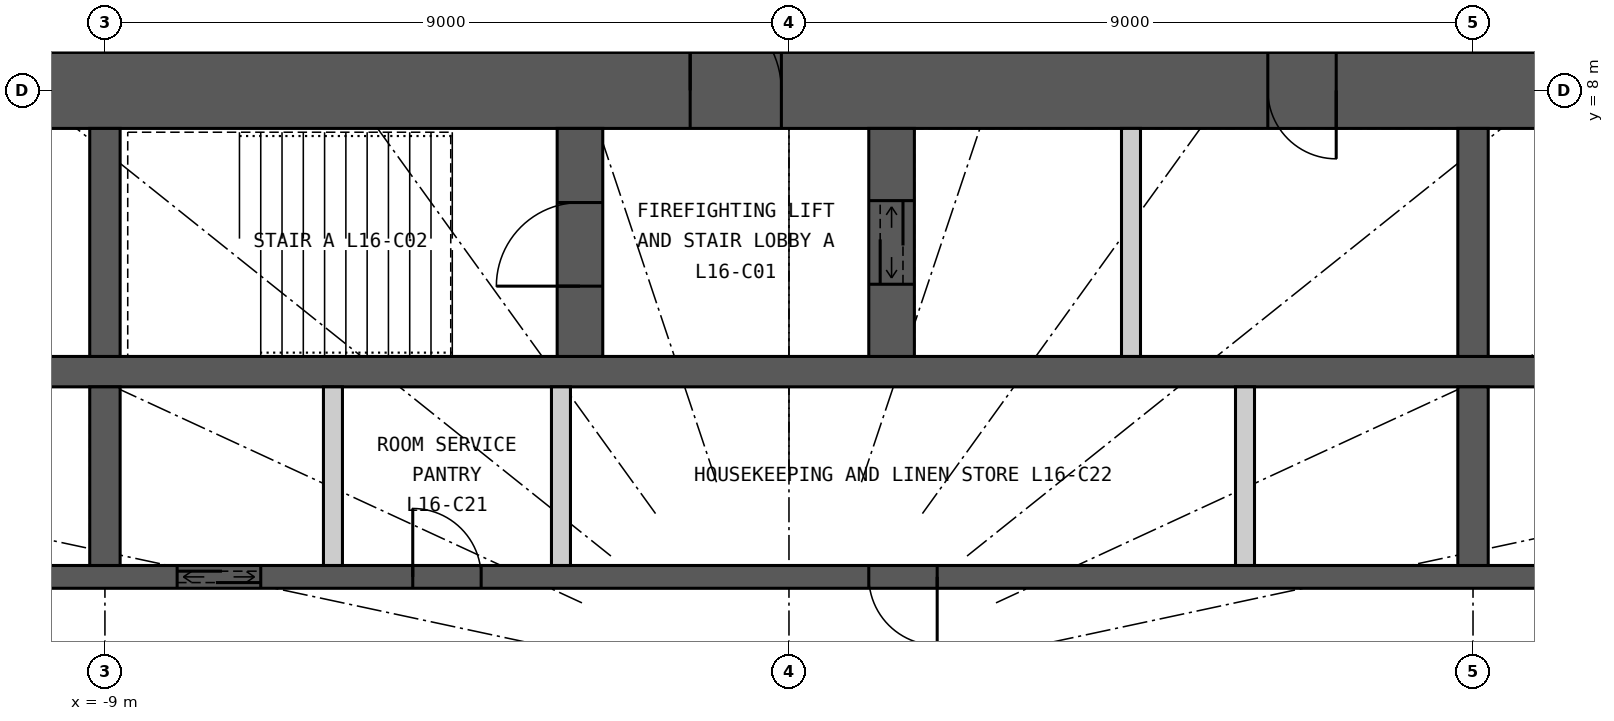
"""IFC4 building model, lengths in metres.
Left out: names, types, materials, properties, quantities, classifications, styles, units other than length and angle.
Written with IfcOpenShell. Run it as: python <this file> out.ifc"""

import sys

from ifc_helpers import new_model, si_unit, direction, frame, frame_2d, origin, place, context, subcontext, project, spatial, rectangle, extrude, element, fill, save


model = new_model("IFC4")
c1 = context("Model", 3, precision=1e-05, world=origin(), true_north=direction((0.0, 1.0)))
c2 = subcontext(c1, "Body", "Model", "MODEL_VIEW")
j1 = project(units=[si_unit("LENGTHUNIT", "METRE"), si_unit("PLANEANGLEUNIT", "RADIAN")], contexts=[c1])
p1 = place(None, origin())
s1 = spatial("IfcSite", under=j1, at=p1, CompositionType="ELEMENT")
p2 = place(p1, origin())
s2 = spatial("IfcBuilding", under=s1, at=p2, CompositionType="ELEMENT")
p3 = place(p2, frame((0.0, 0.0, 67.2)))
s3 = spatial("IfcBuildingStorey", under=s2, at=p3, CompositionType="ELEMENT", Elevation=67.2)
p4 = place(p3, frame((-12.5, 8.0, 0.0), z_axis=(0.0, 0.0, 1.0), x_axis=(1.0, 0.0, 0.0)))
e1 = element("IfcWall", 1, at=p4, inside=s3, PredefinedType="SHEAR", context=c2, shape_type="SweptSolid", body=[
    extrude(rectangle(XDim=25.0, YDim=1.0, at=frame_2d((12.5, 0.0))), origin(), (0.0, 0.0, 1.0), 3.3),
])
p5 = place(p4, frame((11.2, 0.0, 0.0)))
e2 = element("IfcOpeningElement", 2, at=p5, cuts=e1, PredefinedType="OPENING", context=c2, shape_type="SweptSolid", body=[
    extrude(rectangle(XDim=1.2, YDim=2.2, at=frame_2d((0.6, 1.1))), frame((0.0, 0.51, 0.0), z_axis=(0.0, -1.0, 0.0), x_axis=(1.0, 0.0, 0.0)), (0.0, 0.0, 1.0), 1.02),
])
p6 = place(p4, frame((18.8, 0.0, 0.0)))
e3 = element("IfcOpeningElement", 3, at=p6, cuts=e1, PredefinedType="OPENING", context=c2, shape_type="SweptSolid", body=[
    extrude(rectangle(XDim=0.9, YDim=2.2, at=frame_2d((0.45, 1.1))), frame((0.0, 0.51, 0.0), z_axis=(0.0, -1.0, 0.0), x_axis=(1.0, 0.0, 0.0)), (0.0, 0.0, 1.0), 1.02),
])
p7 = place(p3, frame((-11.5, 4.3, 0.0), z_axis=(0.0, 0.0, 1.0), x_axis=(1.0, 0.0, 0.0)))
e4 = element("IfcWall", 4, at=p7, inside=s3, PredefinedType="SHEAR", context=c2, shape_type="SweptSolid", body=[
    extrude(rectangle(XDim=23.0, YDim=0.4, at=frame_2d((11.5, 0.0))), origin(), (0.0, 0.0, 1.0), 3.3),
])
p8 = place(p3, frame((-11.5, 1.6, 0.0), z_axis=(0.0, 0.0, 1.0), x_axis=(1.0, 0.0, 0.0)))
e5 = element("IfcWall", 5, at=p8, inside=s3, PredefinedType="SHEAR", context=c2, shape_type="SweptSolid", body=[
    extrude(rectangle(XDim=23.0, YDim=0.3, at=frame_2d((11.5, 0.0))), origin(), (0.0, 0.0, 1.0), 3.3),
])
p9 = place(p8, frame((0.45, 0.0, 0.0)))
e6 = element("IfcOpeningElement", 6, at=p9, cuts=e5, PredefinedType="OPENING", context=c2, shape_type="SweptSolid", body=[
    extrude(rectangle(XDim=1.1, YDim=2.2, at=frame_2d((0.55, 1.1))), frame((0.0, 0.16, 0.0), z_axis=(0.0, -1.0, 0.0), x_axis=(1.0, 0.0, 0.0)), (0.0, 0.0, 1.0), 0.32),
])
p10 = place(p8, frame((3.45, 0.0, 0.0)))
e7 = element("IfcOpeningElement", 7, at=p10, cuts=e5, PredefinedType="OPENING", context=c2, shape_type="SweptSolid", body=[
    extrude(rectangle(XDim=1.1, YDim=2.2, at=frame_2d((0.55, 1.1))), frame((0.0, 0.16, 0.0), z_axis=(0.0, -1.0, 0.0), x_axis=(1.0, 0.0, 0.0)), (0.0, 0.0, 1.0), 0.32),
])
p11 = place(p8, frame((6.55, 0.0, 0.0)))
e8 = element("IfcOpeningElement", 8, at=p11, cuts=e5, PredefinedType="OPENING", context=c2, shape_type="SweptSolid", body=[
    extrude(rectangle(XDim=0.9, YDim=2.2, at=frame_2d((0.45, 1.1))), frame((0.0, 0.16, 0.0), z_axis=(0.0, -1.0, 0.0), x_axis=(1.0, 0.0, 0.0)), (0.0, 0.0, 1.0), 0.32),
])
p12 = place(p8, frame((12.55, 0.0, 0.0)))
e9 = element("IfcOpeningElement", 9, at=p12, cuts=e5, PredefinedType="OPENING", context=c2, shape_type="SweptSolid", body=[
    extrude(rectangle(XDim=0.9, YDim=2.2, at=frame_2d((0.45, 1.1))), frame((0.0, 0.16, 0.0), z_axis=(0.0, -1.0, 0.0), x_axis=(1.0, 0.0, 0.0)), (0.0, 0.0, 1.0), 0.32),
])
p13 = place(p3, frame((-9.0, 4.5, 0.0), z_axis=(0.0, 0.0, 1.0), x_axis=(0.0, 1.0, 0.0)))
e10 = element("IfcWall", 10, at=p13, inside=s3, PredefinedType="SHEAR", context=c2, shape_type="SweptSolid", body=[
    extrude(rectangle(XDim=3.0, YDim=0.4, at=frame_2d((1.5, 0.0))), origin(), (0.0, 0.0, 1.0), 3.3),
])
p14 = place(p3, frame((-9.0, 1.75, 0.0), z_axis=(0.0, 0.0, 1.0), x_axis=(0.0, 1.0, 0.0)))
e11 = element("IfcWall", 11, at=p14, inside=s3, PredefinedType="SHEAR", context=c2, shape_type="SweptSolid", body=[
    extrude(rectangle(XDim=2.35, YDim=0.4, at=frame_2d((1.175, 0.0))), origin(), (0.0, 0.0, 1.0), 3.3),
])
p15 = place(p3, frame((9.0, 4.5, 0.0), z_axis=(0.0, 0.0, 1.0), x_axis=(0.0, 1.0, 0.0)))
e12 = element("IfcWall", 12, at=p15, inside=s3, PredefinedType="SHEAR", context=c2, shape_type="SweptSolid", body=[
    extrude(rectangle(XDim=3.0, YDim=0.4, at=frame_2d((1.5, 0.0))), origin(), (0.0, 0.0, 1.0), 3.3),
])
p16 = place(p3, frame((9.0, 1.75, 0.0), z_axis=(0.0, 0.0, 1.0), x_axis=(0.0, 1.0, 0.0)))
e13 = element("IfcWall", 13, at=p16, inside=s3, PredefinedType="SHEAR", context=c2, shape_type="SweptSolid", body=[
    extrude(rectangle(XDim=2.35, YDim=0.4, at=frame_2d((1.175, 0.0))), origin(), (0.0, 0.0, 1.0), 3.3),
])
p17 = place(p3, frame((-2.75, 4.5, 0.0), z_axis=(0.0, 0.0, 1.0), x_axis=(0.0, 1.0, 0.0)))
e14 = element("IfcWall", 14, at=p17, inside=s3, PredefinedType="SHEAR", context=c2, shape_type="SweptSolid", body=[
    extrude(rectangle(XDim=3.0, YDim=0.6, at=frame_2d((1.5, 0.0))), origin(), (0.0, 0.0, 1.0), 3.3),
])
p18 = place(p17, frame((0.925, 0.0, 0.0)))
e15 = element("IfcOpeningElement", 15, at=p18, cuts=e14, PredefinedType="OPENING", context=c2, shape_type="SweptSolid", body=[
    extrude(rectangle(XDim=1.1, YDim=2.2, at=frame_2d((0.55, 1.1))), frame((0.0, 0.31, 0.0), z_axis=(0.0, -1.0, 0.0), x_axis=(1.0, 0.0, 0.0)), (0.0, 0.0, 1.0), 0.62),
])
p19 = place(p3, frame((1.35, 4.5, 0.0), z_axis=(0.0, 0.0, 1.0), x_axis=(0.0, 1.0, 0.0)))
e16 = element("IfcWall", 16, at=p19, inside=s3, PredefinedType="SHEAR", context=c2, shape_type="SweptSolid", body=[
    extrude(rectangle(XDim=3.0, YDim=0.6, at=frame_2d((1.5, 0.0))), origin(), (0.0, 0.0, 1.0), 3.3),
])
p20 = place(p19, frame((0.95, 0.0, 0.0)))
e17 = element("IfcOpeningElement", 17, at=p20, cuts=e16, PredefinedType="OPENING", context=c2, shape_type="SweptSolid", body=[
    extrude(rectangle(XDim=1.1, YDim=2.2, at=frame_2d((0.55, 1.1))), frame((0.0, 0.31, 0.0), z_axis=(0.0, -1.0, 0.0), x_axis=(1.0, 0.0, 0.0)), (0.0, 0.0, 1.0), 0.62),
])
p21 = place(p3, frame((4.5, 4.5, 0.0), z_axis=(0.0, 0.0, 1.0), x_axis=(0.0, 1.0, 0.0)))
e18 = element("IfcWall", 18, at=p21, inside=s3, PredefinedType="PARTITIONING", context=c2, shape_type="SweptSolid", body=[
    extrude(rectangle(XDim=3.0, YDim=0.25, at=frame_2d((1.5, 0.0))), origin(), (0.0, 0.0, 1.0), 3.3),
])
for number, where, z_axis, x_axis in (
    (19, (-6.0, 1.75, 0.0), (0.0, 0.0, 1.0), (0.0, 1.0, 0.0)),
    (20, (-3.0, 1.75, 0.0), (0.0, 0.0, 1.0), (0.0, 1.0, 0.0)),
    (21, (6.0, 1.75, 0.0), (0.0, 0.0, 1.0), (0.0, 1.0, 0.0)),
):
    element("IfcWall", number, at=place(p3, frame(where, z_axis=z_axis, x_axis=x_axis)), inside=s3, PredefinedType="PARTITIONING", context=c2, shape_type="SweptSolid", body=[
        extrude(rectangle(XDim=2.35, YDim=0.25, at=frame_2d((1.175, 0.0))), origin(), (0.0, 0.0, 1.0), 3.3),
    ])
p22 = place(p5, origin())
e22 = element("IfcDoor", 22, at=p22, inside=s3, OperationType="SINGLE_SWING_LEFT", PredefinedType="DOOR", context=c2, shape_type="SweptSolid", body=[
    extrude(rectangle(XDim=1.2, YDim=2.2, at=frame_2d((0.6, 1.1))), frame((0.0, 0.025, 0.0), z_axis=(0.0, -1.0, 0.0), x_axis=(1.0, 0.0, 0.0)), (0.0, 0.0, 1.0), 0.05),
])
fill(e2, e22)
p23 = place(p18, origin())
e23 = element("IfcDoor", 23, at=p23, inside=s3, OperationType="SINGLE_SWING_LEFT", PredefinedType="DOOR", context=c2, shape_type="SweptSolid", body=[
    extrude(rectangle(XDim=1.1, YDim=2.2, at=frame_2d((0.55, 1.1))), frame((0.0, 0.025, 0.0), z_axis=(0.0, -1.0, 0.0), x_axis=(1.0, 0.0, 0.0)), (0.0, 0.0, 1.0), 0.05),
])
fill(e15, e23)
p24 = place(p20, origin())
e24 = element("IfcDoor", 24, at=p24, inside=s3, OperationType="DOUBLE_DOOR_SLIDING", PredefinedType="DOOR", context=c2, shape_type="SweptSolid", body=[
    extrude(rectangle(XDim=1.1, YDim=2.2, at=frame_2d((0.55, 1.1))), frame((0.0, 0.025, 0.0), z_axis=(0.0, -1.0, 0.0), x_axis=(1.0, 0.0, 0.0)), (0.0, 0.0, 1.0), 0.05),
])
fill(e17, e24)
p25 = place(p6, origin())
e25 = element("IfcDoor", 25, at=p25, inside=s3, OperationType="SINGLE_SWING_RIGHT", PredefinedType="DOOR", context=c2, shape_type="SweptSolid", body=[
    extrude(rectangle(XDim=0.9, YDim=2.2, at=frame_2d((0.45, 1.1))), frame((0.0, 0.025, 0.0), z_axis=(0.0, -1.0, 0.0), x_axis=(1.0, 0.0, 0.0)), (0.0, 0.0, 1.0), 0.05),
])
fill(e3, e25)
p26 = place(p10, origin())
e26 = element("IfcDoor", 26, at=p26, inside=s3, OperationType="DOUBLE_DOOR_SLIDING", PredefinedType="DOOR", context=c2, shape_type="SweptSolid", body=[
    extrude(rectangle(XDim=1.1, YDim=2.2, at=frame_2d((0.55, 1.1))), frame((0.0, 0.025, 0.0), z_axis=(0.0, -1.0, 0.0), x_axis=(1.0, 0.0, 0.0)), (0.0, 0.0, 1.0), 0.05),
])
fill(e7, e26)
p27 = place(p11, origin())
e27 = element("IfcDoor", 27, at=p27, inside=s3, OperationType="SINGLE_SWING_LEFT", PredefinedType="DOOR", context=c2, shape_type="SweptSolid", body=[
    extrude(rectangle(XDim=0.9, YDim=2.2, at=frame_2d((0.45, 1.1))), frame((0.0, 0.025, 0.0), z_axis=(0.0, -1.0, 0.0), x_axis=(1.0, 0.0, 0.0)), (0.0, 0.0, 1.0), 0.05),
])
fill(e8, e27)
p28 = place(p12, origin())
e28 = element("IfcDoor", 28, at=p28, inside=s3, OperationType="SINGLE_SWING_RIGHT", PredefinedType="DOOR", context=c2, shape_type="SweptSolid", body=[
    extrude(rectangle(XDim=0.9, YDim=2.2, at=frame_2d((0.45, 1.1))), frame((0.0, 0.025, 0.0), z_axis=(0.0, -1.0, 0.0), x_axis=(1.0, 0.0, 0.0)), (0.0, 0.0, 1.0), 0.05),
])
fill(e9, e28)
save(model, sys.argv[1])
